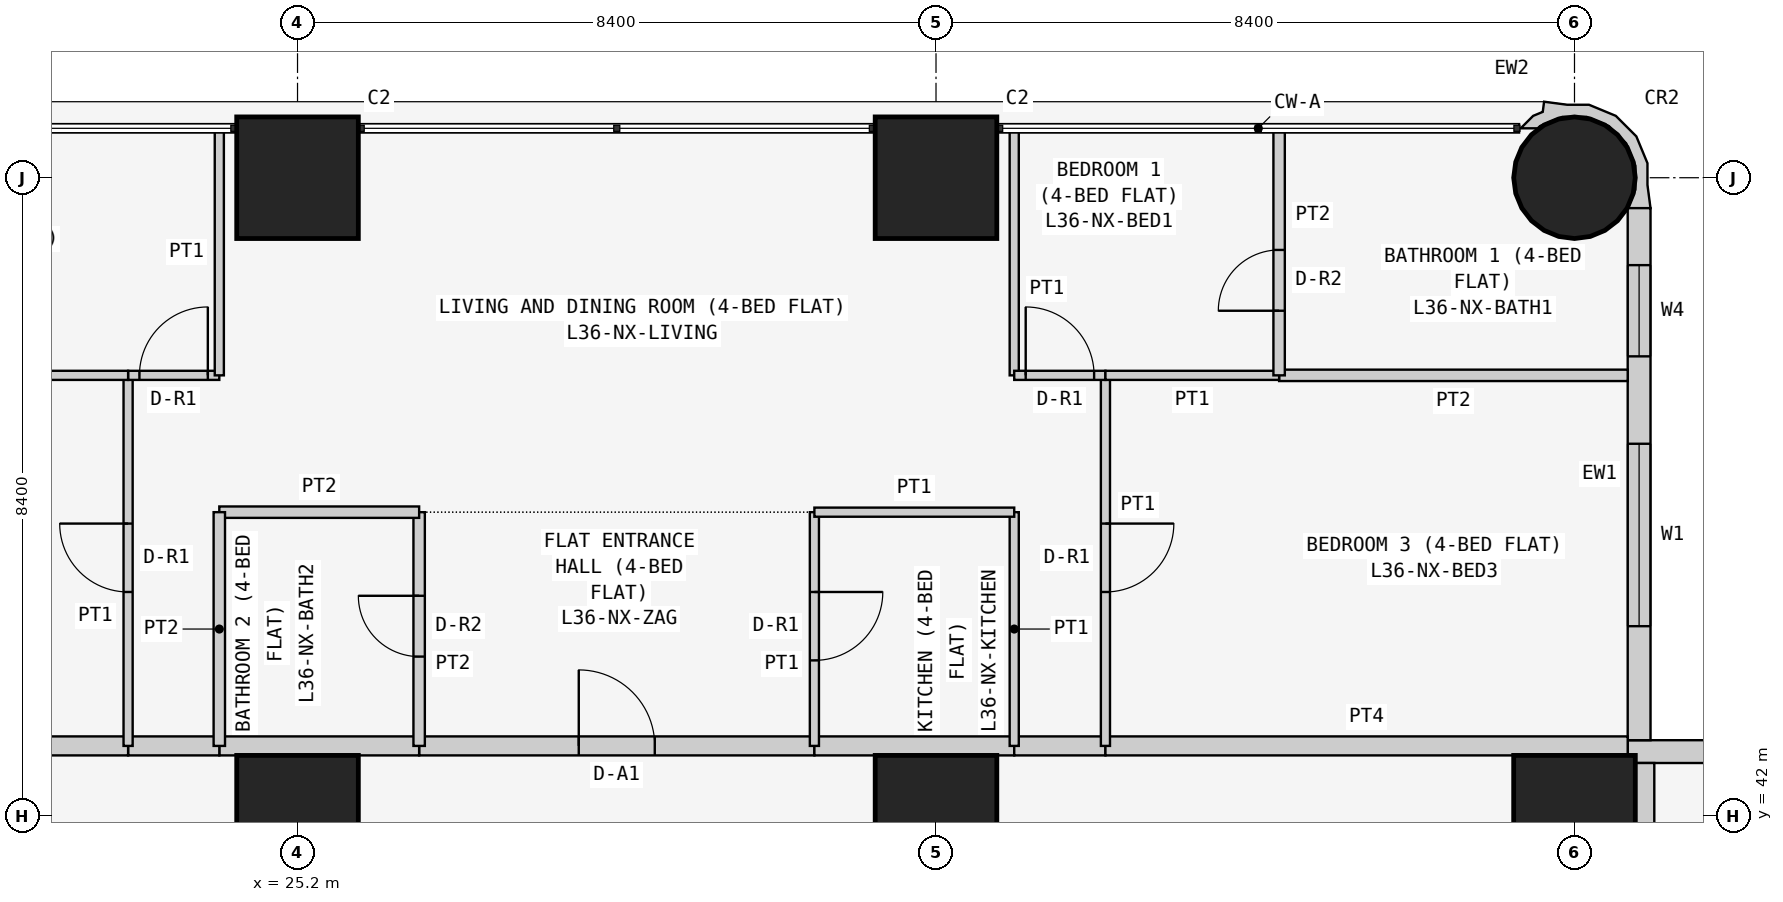
"""IFC4 building model, lengths in metres.
Left out: names, types, materials, properties, quantities, classifications, styles, units other than length and angle.
Written with IfcOpenShell. Run it as: python <this file> out.ifc"""

import sys

from ifc_helpers import new_model, si_unit, direction, frame, frame_2d, origin, origin_2d, place, context, subcontext, project, spatial, polyline, rectangle, circle, outline, extrude, element, fill, save


model = new_model("IFC4")
c1 = context("Model", 3, precision=1e-05, world=origin(), true_north=direction((0.0, 1.0)))
c2 = subcontext(c1, "Body", "Model", "MODEL_VIEW")
j1 = project(units=[si_unit("LENGTHUNIT", "METRE"), si_unit("PLANEANGLEUNIT", "RADIAN")], contexts=[c1])
p1 = place(None, origin())
s1 = spatial("IfcSite", under=j1, at=p1, CompositionType="ELEMENT")
p2 = place(p1, origin())
s2 = spatial("IfcBuilding", under=s1, at=p2, CompositionType="ELEMENT")
p3 = place(p2, frame((0.0, 0.0, 141.3)))
s3 = spatial("IfcBuildingStorey", under=s2, at=p3, CompositionType="ELEMENT", Elevation=141.3)
for number, where, z_axis, x_axis in (
    (1, (25.2, 42.0, 0.0), (0.0, 0.0, 1.0), (1.0, 0.0, 0.0)),
    (2, (25.2, 50.4, 0.0), (0.0, 0.0, 1.0), (1.0, 0.0, 0.0)),
    (3, (33.6, 42.0, 0.0), (0.0, 0.0, 1.0), (1.0, 0.0, 0.0)),
    (4, (33.6, 50.4, 0.0), (0.0, 0.0, 1.0), (1.0, 0.0, 0.0)),
    (5, (42.0, 42.0, 0.0), (0.0, 0.0, 1.0), (1.0, 0.0, 0.0)),
):
    element("IfcColumn", number, at=place(p3, frame(where, z_axis=z_axis, x_axis=x_axis)), inside=s3, PredefinedType="COLUMN", context=c2, shape_type="SweptSolid", body=[
        extrude(rectangle(XDim=1.6, YDim=1.6, at=origin_2d()), origin(), (0.0, 0.0, 1.0), 3.6),
    ])
p4 = place(p3, frame((42.0, 50.4, 0.0), z_axis=(0.0, 0.0, 1.0), x_axis=(1.0, 0.0, 0.0)))
e6 = element("IfcColumn", 6, at=p4, inside=s3, PredefinedType="COLUMN", context=c2, shape_type="SweptSolid", body=[
    extrude(circle(Radius=0.8, at=origin_2d()), origin(), (0.0, 0.0, 1.0), 3.6),
])
p5 = place(p3, frame((58.4, 42.85, 0.0), z_axis=(0.0, 0.0, 1.0), x_axis=(-1.0, 0.0, 0.0)))
e7 = element("IfcWall", 7, at=p5, inside=s3, PredefinedType="SOLIDWALL", context=c2, shape_type="SweptSolid", body=[
    extrude(rectangle(XDim=15.7, YDim=0.3, at=frame_2d((7.85, 0.0))), origin(), (0.0, 0.0, 1.0), 3.45),
])
p6 = place(p5, frame((12.4, 0.0, 0.9)))
e8 = element("IfcOpeningElement", 8, at=p6, cuts=e7, PredefinedType="OPENING", context=c2, shape_type="SweptSolid", body=[
    extrude(rectangle(XDim=1.8, YDim=1.5, at=frame_2d((0.9, 0.75))), frame((0.0, 0.16, 0.0), z_axis=(0.0, -1.0, 0.0), x_axis=(1.0, 0.0, 0.0)), (0.0, 0.0, 1.0), 0.32),
])
p7 = place(p5, frame((9.55, 0.0, 1.5)))
e9 = element("IfcOpeningElement", 9, at=p7, cuts=e7, PredefinedType="OPENING", context=c2, shape_type="SweptSolid", body=[
    extrude(rectangle(XDim=0.9, YDim=0.7, at=frame_2d((0.45, 0.35))), frame((0.0, 0.16, 0.0), z_axis=(0.0, -1.0, 0.0), x_axis=(1.0, 0.0, 0.0)), (0.0, 0.0, 1.0), 0.32),
])
p8 = place(p5, frame((5.1, 0.0, 0.9)))
e10 = element("IfcOpeningElement", 10, at=p8, cuts=e7, PredefinedType="OPENING", context=c2, shape_type="SweptSolid", body=[
    extrude(rectangle(XDim=1.8, YDim=1.5, at=frame_2d((0.9, 0.75))), frame((0.0, 0.16, 0.0), z_axis=(0.0, -1.0, 0.0), x_axis=(1.0, 0.0, 0.0)), (0.0, 0.0, 1.0), 0.32),
])
p9 = place(p5, frame((2.0, 0.0, 0.0)))
e11 = element("IfcOpeningElement", 11, at=p9, cuts=e7, PredefinedType="OPENING", context=c2, shape_type="SweptSolid", body=[
    extrude(rectangle(XDim=0.9, YDim=2.4, at=frame_2d((0.45, 1.2))), frame((0.0, 0.16, 0.0), z_axis=(0.0, -1.0, 0.0), x_axis=(1.0, 0.0, 0.0)), (0.0, 0.0, 1.0), 0.32),
])
p10 = place(p5, frame((0.7, 0.0, 0.9)))
e12 = element("IfcOpeningElement", 12, at=p10, cuts=e7, PredefinedType="OPENING", context=c2, shape_type="SweptSolid", body=[
    extrude(rectangle(XDim=1.2, YDim=1.5, at=frame_2d((0.6, 0.75))), frame((0.0, 0.16, 0.0), z_axis=(0.0, -1.0, 0.0), x_axis=(1.0, 0.0, 0.0)), (0.0, 0.0, 1.0), 0.32),
])
p11 = place(p3, frame((42.85, 43.0, 0.0), z_axis=(0.0, 0.0, 1.0), x_axis=(0.0, 1.0, 0.0)))
e13 = element("IfcWall", 13, at=p11, inside=s3, PredefinedType="SOLIDWALL", context=c2, shape_type="SweptSolid", body=[
    extrude(rectangle(XDim=7.0, YDim=0.3, at=frame_2d((3.5, 0.0))), origin(), (0.0, 0.0, 1.0), 3.45),
])
p12 = place(p11, frame((1.5, 0.0, 0.9)))
e14 = element("IfcOpeningElement", 14, at=p12, cuts=e13, PredefinedType="OPENING", context=c2, shape_type="SweptSolid", body=[
    extrude(rectangle(XDim=2.4, YDim=1.5, at=frame_2d((1.2, 0.75))), frame((0.0, 0.16, 0.0), z_axis=(0.0, -1.0, 0.0), x_axis=(1.0, 0.0, 0.0)), (0.0, 0.0, 1.0), 0.32),
])
p13 = place(p11, frame((5.05, 0.0, 0.9)))
e15 = element("IfcOpeningElement", 15, at=p13, cuts=e13, PredefinedType="OPENING", context=c2, shape_type="SweptSolid", body=[
    extrude(rectangle(XDim=1.2, YDim=1.5, at=frame_2d((0.6, 0.75))), frame((0.0, 0.16, 0.0), z_axis=(0.0, -1.0, 0.0), x_axis=(1.0, 0.0, 0.0)), (0.0, 0.0, 1.0), 0.32),
])
p14 = place(p3, frame((42.817, 50.073, 0.0), z_axis=(0.0, 0.0, 1.0), x_axis=(0.343276641956, 0.93923434088, 0.0)))
e16 = element("IfcWall", 16, at=p14, inside=s3, PredefinedType="SOLIDWALL", context=c2, shape_type="SweptSolid", body=[
    extrude(outline(polyline([(0.266, -0.055), (0.535, 0.044), (0.817, 0.302), (0.978, 0.648), (0.994, 1.03), (0.895, 1.3), (0.828, 1.598), (0.697, 1.569), (0.604, 1.67), (0.394, 1.767), (0.471, 1.556), (0.509, 1.539), (0.724, 1.304), (0.833, 1.005), (0.82, 0.687), (0.686, 0.397), (0.451, 0.182), (0.152, 0.073), (-0.116, 0.084), (-0.128, 0.078), (-0.146, 0.071), (-0.006, -0.197), (0.266, -0.055)])), origin(), (0.0, 0.0, 1.0), 3.45),
])
p15 = place(p3, frame((26.8, 42.925, 0.0), z_axis=(0.0, 0.0, 1.0), x_axis=(1.0, 0.0, 0.0)))
e17 = element("IfcWall", 17, at=p15, inside=s3, PredefinedType="PARTITIONING", context=c2, shape_type="SweptSolid", body=[
    extrude(rectangle(XDim=5.2, YDim=0.25, at=frame_2d((2.6, 0.0))), origin(), (0.0, 0.0, 1.0), 3.45),
])
p16 = place(p15, frame((2.1, 0.0, 0.0)))
e18 = element("IfcOpeningElement", 18, at=p16, cuts=e17, PredefinedType="OPENING", context=c2, shape_type="SweptSolid", body=[
    extrude(rectangle(XDim=1.0, YDim=2.1, at=frame_2d((0.5, 1.05))), frame((0.0, 0.135, 0.0), z_axis=(0.0, -1.0, 0.0), x_axis=(1.0, 0.0, 0.0)), (0.0, 0.0, 1.0), 0.27),
])
p17 = place(p3, frame((24.171, 42.925, 0.0), z_axis=(0.0, 0.0, 1.0), x_axis=(1.0, 0.0, 0.0)))
e19 = element("IfcWall", 19, at=p17, inside=s3, PredefinedType="PARTITIONING", context=c2, shape_type="SweptSolid", body=[
    extrude(rectangle(XDim=2.629, YDim=0.25, at=frame_2d((1.314, 0.0))), origin(), (0.0, 0.0, 1.0), 3.45),
])
p18 = place(p3, frame((32.0, 42.925, 0.0), z_axis=(0.0, 0.0, 1.0), x_axis=(1.0, 0.0, 0.0)))
e20 = element("IfcWall", 20, at=p18, inside=s3, PredefinedType="PARTITIONING", context=c2, shape_type="SweptSolid", body=[
    extrude(rectangle(XDim=2.629, YDim=0.25, at=frame_2d((1.314, 0.0))), origin(), (0.0, 0.0, 1.0), 3.45),
])
p19 = place(p3, frame((22.971, 42.925, 0.0), z_axis=(0.0, 0.0, 1.0), x_axis=(1.0, 0.0, 0.0)))
e21 = element("IfcWall", 21, at=p19, inside=s3, PredefinedType="PARTITIONING", context=c2, shape_type="SweptSolid", body=[
    extrude(rectangle(XDim=1.2, YDim=0.25, at=frame_2d((0.6, 0.0))), origin(), (0.0, 0.0, 1.0), 3.45),
])
p20 = place(p3, frame((34.629, 42.925, 0.0), z_axis=(0.0, 0.0, 1.0), x_axis=(1.0, 0.0, 0.0)))
e22 = element("IfcWall", 22, at=p20, inside=s3, PredefinedType="PARTITIONING", context=c2, shape_type="SweptSolid", body=[
    extrude(rectangle(XDim=1.2, YDim=0.25, at=frame_2d((0.6, 0.0))), origin(), (0.0, 0.0, 1.0), 3.45),
])
for number, where, z_axis, x_axis in (
    (23, (16.1, 42.925, 0.0), (0.0, 0.0, 1.0), (1.0, 0.0, 0.0)),
    (24, (35.829, 42.925, 0.0), (0.0, 0.0, 1.0), (1.0, 0.0, 0.0)),
    (25, (42.925, 42.7, 0.0), (0.0, 0.0, 1.0), (0.0, -1.0, 0.0)),
):
    element("IfcWall", number, at=place(p3, frame(where, z_axis=z_axis, x_axis=x_axis)), inside=s3, PredefinedType="PARTITIONING", context=c2, shape_type="SweptSolid", body=[
        extrude(rectangle(XDim=6.871, YDim=0.25, at=frame_2d((3.436, 0.0))), origin(), (0.0, 0.0, 1.0), 3.45),
    ])
p21 = place(p3, frame((26.8, 46.0, 0.0), z_axis=(0.0, 0.0, 1.0), x_axis=(0.0, -1.0, 0.0)))
e26 = element("IfcWall", 26, at=p21, inside=s3, PredefinedType="PARTITIONING", context=c2, shape_type="SweptSolid", body=[
    extrude(rectangle(XDim=3.075, YDim=0.15, at=frame_2d((1.538, 0.0))), origin(), (0.0, 0.0, 1.0), 3.45),
])
p22 = place(p21, frame((1.1, 0.0, 0.0)))
e27 = element("IfcOpeningElement", 27, at=p22, cuts=e26, PredefinedType="OPENING", context=c2, shape_type="SweptSolid", body=[
    extrude(rectangle(XDim=0.8, YDim=2.1, at=frame_2d((0.4, 1.05))), frame((0.0, 0.085, 0.0), z_axis=(0.0, -1.0, 0.0), x_axis=(1.0, 0.0, 0.0)), (0.0, 0.0, 1.0), 0.17),
])
p23 = place(p3, frame((32.0, 42.925, 0.0), z_axis=(0.0, 0.0, 1.0), x_axis=(0.0, 1.0, 0.0)))
e28 = element("IfcWall", 28, at=p23, inside=s3, PredefinedType="PARTITIONING", context=c2, shape_type="SweptSolid", body=[
    extrude(rectangle(XDim=3.075, YDim=0.12, at=frame_2d((1.538, 0.0))), origin(), (0.0, 0.0, 1.0), 3.45),
])
p24 = place(p23, frame((1.125, 0.0, 0.0)))
e29 = element("IfcOpeningElement", 29, at=p24, cuts=e28, PredefinedType="OPENING", context=c2, shape_type="SweptSolid", body=[
    extrude(rectangle(XDim=0.9, YDim=2.1, at=frame_2d((0.45, 1.05))), frame((0.0, 0.07, 0.0), z_axis=(0.0, -1.0, 0.0), x_axis=(1.0, 0.0, 0.0)), (0.0, 0.0, 1.0), 0.14),
])
p25 = place(p3, frame((26.8, 46.0, 0.0), z_axis=(0.0, 0.0, 1.0), x_axis=(-1.0, 0.0, 0.0)))
e30 = element("IfcWall", 30, at=p25, inside=s3, PredefinedType="PARTITIONING", context=c2, shape_type="SweptSolid", body=[
    extrude(rectangle(XDim=2.629, YDim=0.15, at=frame_2d((1.314, 0.0))), origin(), (0.0, 0.0, 1.0), 3.45),
])
p26 = place(p3, frame((24.171, 46.0, 0.0), z_axis=(0.0, 0.0, 1.0), x_axis=(0.0, -1.0, 0.0)))
e31 = element("IfcWall", 31, at=p26, inside=s3, PredefinedType="PARTITIONING", context=c2, shape_type="SweptSolid", body=[
    extrude(rectangle(XDim=3.075, YDim=0.15, at=frame_2d((1.538, 0.0))), origin(), (0.0, 0.0, 1.0), 3.45),
])
p27 = place(p3, frame((34.629, 42.925, 0.0), z_axis=(0.0, 0.0, 1.0), x_axis=(0.0, 1.0, 0.0)))
e32 = element("IfcWall", 32, at=p27, inside=s3, PredefinedType="PARTITIONING", context=c2, shape_type="SweptSolid", body=[
    extrude(rectangle(XDim=3.075, YDim=0.12, at=frame_2d((1.538, 0.0))), origin(), (0.0, 0.0, 1.0), 3.45),
])
p28 = place(p3, frame((34.629, 46.0, 0.0), z_axis=(0.0, 0.0, 1.0), x_axis=(-1.0, 0.0, 0.0)))
e33 = element("IfcWall", 33, at=p28, inside=s3, PredefinedType="PARTITIONING", context=c2, shape_type="SweptSolid", body=[
    extrude(rectangle(XDim=2.629, YDim=0.12, at=frame_2d((1.314, 0.0))), origin(), (0.0, 0.0, 1.0), 3.45),
])
p29 = place(p3, frame((22.971, 42.925, 0.0), z_axis=(0.0, 0.0, 1.0), x_axis=(0.0, 1.0, 0.0)))
e34 = element("IfcWall", 34, at=p29, inside=s3, PredefinedType="PARTITIONING", context=c2, shape_type="SweptSolid", body=[
    extrude(rectangle(XDim=4.875, YDim=0.12, at=frame_2d((2.438, 0.0))), origin(), (0.0, 0.0, 1.0), 3.45),
])
p30 = place(p29, frame((2.025, 0.0, 0.0)))
e35 = element("IfcOpeningElement", 35, at=p30, cuts=e34, PredefinedType="OPENING", context=c2, shape_type="SweptSolid", body=[
    extrude(rectangle(XDim=0.9, YDim=2.1, at=frame_2d((0.45, 1.05))), frame((0.0, 0.07, 0.0), z_axis=(0.0, -1.0, 0.0), x_axis=(1.0, 0.0, 0.0)), (0.0, 0.0, 1.0), 0.14),
])
p31 = place(p3, frame((22.971, 47.8, 0.0), z_axis=(0.0, 0.0, 1.0), x_axis=(1.0, 0.0, 0.0)))
e36 = element("IfcWall", 36, at=p31, inside=s3, PredefinedType="PARTITIONING", context=c2, shape_type="SweptSolid", body=[
    extrude(rectangle(XDim=1.2, YDim=0.12, at=frame_2d((0.6, 0.0))), origin(), (0.0, 0.0, 1.0), 3.45),
])
p32 = place(p31, frame((0.149, 0.0, 0.0)))
e37 = element("IfcOpeningElement", 37, at=p32, cuts=e36, PredefinedType="OPENING", context=c2, shape_type="SweptSolid", body=[
    extrude(rectangle(XDim=0.9, YDim=2.1, at=frame_2d((0.45, 1.05))), frame((0.0, 0.07, 0.0), z_axis=(0.0, -1.0, 0.0), x_axis=(1.0, 0.0, 0.0)), (0.0, 0.0, 1.0), 0.14),
])
p33 = place(p3, frame((24.171, 47.8, 0.0), z_axis=(0.0, 0.0, 1.0), x_axis=(0.0, 1.0, 0.0)))
e38 = element("IfcWall", 38, at=p33, inside=s3, PredefinedType="PARTITIONING", context=c2, shape_type="SweptSolid", body=[
    extrude(rectangle(XDim=3.25, YDim=0.12, at=frame_2d((1.625, 0.0))), origin(), (0.0, 0.0, 1.0), 3.45),
])
p34 = place(p3, frame((35.829, 47.8, 0.0), z_axis=(0.0, 0.0, 1.0), x_axis=(0.0, -1.0, 0.0)))
e39 = element("IfcWall", 39, at=p34, inside=s3, PredefinedType="PARTITIONING", context=c2, shape_type="SweptSolid", body=[
    extrude(rectangle(XDim=4.875, YDim=0.12, at=frame_2d((2.438, 0.0))), origin(), (0.0, 0.0, 1.0), 3.45),
])
p35 = place(p34, frame((1.95, 0.0, 0.0)))
e40 = element("IfcOpeningElement", 40, at=p35, cuts=e39, PredefinedType="OPENING", context=c2, shape_type="SweptSolid", body=[
    extrude(rectangle(XDim=0.9, YDim=2.1, at=frame_2d((0.45, 1.05))), frame((0.0, 0.07, 0.0), z_axis=(0.0, -1.0, 0.0), x_axis=(1.0, 0.0, 0.0)), (0.0, 0.0, 1.0), 0.14),
])
p36 = place(p3, frame((34.629, 51.05, 0.0), z_axis=(0.0, 0.0, 1.0), x_axis=(0.0, -1.0, 0.0)))
e41 = element("IfcWall", 41, at=p36, inside=s3, PredefinedType="PARTITIONING", context=c2, shape_type="SweptSolid", body=[
    extrude(rectangle(XDim=3.25, YDim=0.12, at=frame_2d((1.625, 0.0))), origin(), (0.0, 0.0, 1.0), 3.45),
])
p37 = place(p3, frame((34.629, 47.8, 0.0), z_axis=(0.0, 0.0, 1.0), x_axis=(1.0, 0.0, 0.0)))
e42 = element("IfcWall", 42, at=p37, inside=s3, PredefinedType="PARTITIONING", context=c2, shape_type="SweptSolid", body=[
    extrude(rectangle(XDim=1.2, YDim=0.12, at=frame_2d((0.6, 0.0))), origin(), (0.0, 0.0, 1.0), 3.45),
])
p38 = place(p37, frame((0.151, 0.0, 0.0)))
e43 = element("IfcOpeningElement", 43, at=p38, cuts=e42, PredefinedType="OPENING", context=c2, shape_type="SweptSolid", body=[
    extrude(rectangle(XDim=0.9, YDim=2.1, at=frame_2d((0.45, 1.05))), frame((0.0, 0.07, 0.0), z_axis=(0.0, -1.0, 0.0), x_axis=(1.0, 0.0, 0.0)), (0.0, 0.0, 1.0), 0.14),
])
p39 = place(p3, frame((22.971, 47.8, 0.0), z_axis=(0.0, 0.0, 1.0), x_axis=(-1.0, 0.0, 0.0)))
e44 = element("IfcWall", 44, at=p39, inside=s3, PredefinedType="PARTITIONING", context=c2, shape_type="SweptSolid", body=[
    extrude(rectangle(XDim=6.871, YDim=0.12, at=frame_2d((3.436, 0.0))), origin(), (0.0, 0.0, 1.0), 3.45),
])
p40 = place(p3, frame((42.7, 47.8, 0.0), z_axis=(0.0, 0.0, 1.0), x_axis=(-1.0, 0.0, 0.0)))
e45 = element("IfcWall", 45, at=p40, inside=s3, PredefinedType="PARTITIONING", context=c2, shape_type="SweptSolid", body=[
    extrude(rectangle(XDim=4.586, YDim=0.15, at=frame_2d((2.293, 0.0))), origin(), (0.0, 0.0, 1.0), 3.45),
])
p41 = place(p3, frame((38.114, 47.8, 0.0), z_axis=(0.0, 0.0, 1.0), x_axis=(-1.0, 0.0, 0.0)))
e46 = element("IfcWall", 46, at=p41, inside=s3, PredefinedType="PARTITIONING", context=c2, shape_type="SweptSolid", body=[
    extrude(rectangle(XDim=2.285, YDim=0.12, at=frame_2d((1.143, 0.0))), origin(), (0.0, 0.0, 1.0), 3.45),
])
p42 = place(p3, frame((38.114, 51.05, 0.0), z_axis=(0.0, 0.0, 1.0), x_axis=(0.0, -1.0, 0.0)))
e47 = element("IfcWall", 47, at=p42, inside=s3, PredefinedType="PARTITIONING", context=c2, shape_type="SweptSolid", body=[
    extrude(rectangle(XDim=3.25, YDim=0.15, at=frame_2d((1.625, 0.0))), origin(), (0.0, 0.0, 1.0), 3.45),
])
p43 = place(p42, frame((1.6, 0.0, 0.0)))
e48 = element("IfcOpeningElement", 48, at=p43, cuts=e47, PredefinedType="OPENING", context=c2, shape_type="SweptSolid", body=[
    extrude(rectangle(XDim=0.8, YDim=2.1, at=frame_2d((0.4, 1.05))), frame((0.0, 0.085, 0.0), z_axis=(0.0, -1.0, 0.0), x_axis=(1.0, 0.0, 0.0)), (0.0, 0.0, 1.0), 0.17),
])
p44 = place(p12, origin())
e49 = element("IfcWindow", 49, at=p44, inside=s3, PartitioningType="SINGLE_PANEL", PredefinedType="WINDOW", context=c2, shape_type="SweptSolid", body=[
    extrude(rectangle(XDim=2.4, YDim=1.5, at=frame_2d((1.2, 0.75))), frame((0.0, 0.03, 0.0), z_axis=(0.0, -1.0, 0.0), x_axis=(1.0, 0.0, 0.0)), (0.0, 0.0, 1.0), 0.06),
])
fill(e14, e49)
p45 = place(p13, origin())
e50 = element("IfcWindow", 50, at=p45, inside=s3, PartitioningType="SINGLE_PANEL", PredefinedType="WINDOW", context=c2, shape_type="SweptSolid", body=[
    extrude(rectangle(XDim=1.2, YDim=1.5, at=frame_2d((0.6, 0.75))), frame((0.0, 0.03, 0.0), z_axis=(0.0, -1.0, 0.0), x_axis=(1.0, 0.0, 0.0)), (0.0, 0.0, 1.0), 0.06),
])
fill(e15, e50)
p46 = place(p16, origin())
e51 = element("IfcDoor", 51, at=p46, inside=s3, OperationType="SINGLE_SWING_LEFT", PredefinedType="DOOR", context=c2, shape_type="SweptSolid", body=[
    extrude(rectangle(XDim=1.0, YDim=2.1, at=frame_2d((0.5, 1.05))), frame((0.0, 0.025, 0.0), z_axis=(0.0, -1.0, 0.0), x_axis=(1.0, 0.0, 0.0)), (0.0, 0.0, 1.0), 0.05),
])
fill(e18, e51)
p47 = place(p22, frame((0.8, 0.0, 0.0), z_axis=(0.0, 0.0, 1.0), x_axis=(-1.0, 0.0, 0.0)))
e52 = element("IfcDoor", 52, at=p47, inside=s3, OperationType="SINGLE_SWING_RIGHT", PredefinedType="DOOR", context=c2, shape_type="SweptSolid", body=[
    extrude(rectangle(XDim=0.8, YDim=2.1, at=frame_2d((0.4, 1.05))), frame((0.0, 0.025, 0.0), z_axis=(0.0, -1.0, 0.0), x_axis=(1.0, 0.0, 0.0)), (0.0, 0.0, 1.0), 0.05),
])
fill(e27, e52)
p48 = place(p24, frame((0.9, 0.0, 0.0), z_axis=(0.0, 0.0, 1.0), x_axis=(-1.0, 0.0, 0.0)))
e53 = element("IfcDoor", 53, at=p48, inside=s3, OperationType="SINGLE_SWING_LEFT", PredefinedType="DOOR", context=c2, shape_type="SweptSolid", body=[
    extrude(rectangle(XDim=0.9, YDim=2.1, at=frame_2d((0.45, 1.05))), frame((0.0, 0.025, 0.0), z_axis=(0.0, -1.0, 0.0), x_axis=(1.0, 0.0, 0.0)), (0.0, 0.0, 1.0), 0.05),
])
fill(e29, e53)
p49 = place(p30, origin())
e54 = element("IfcDoor", 54, at=p49, inside=s3, OperationType="SINGLE_SWING_RIGHT", PredefinedType="DOOR", context=c2, shape_type="SweptSolid", body=[
    extrude(rectangle(XDim=0.9, YDim=2.1, at=frame_2d((0.45, 1.05))), frame((0.0, 0.025, 0.0), z_axis=(0.0, -1.0, 0.0), x_axis=(1.0, 0.0, 0.0)), (0.0, 0.0, 1.0), 0.05),
])
fill(e35, e54)
p50 = place(p32, origin())
e55 = element("IfcDoor", 55, at=p50, inside=s3, OperationType="SINGLE_SWING_RIGHT", PredefinedType="DOOR", context=c2, shape_type="SweptSolid", body=[
    extrude(rectangle(XDim=0.9, YDim=2.1, at=frame_2d((0.45, 1.05))), frame((0.0, 0.025, 0.0), z_axis=(0.0, -1.0, 0.0), x_axis=(1.0, 0.0, 0.0)), (0.0, 0.0, 1.0), 0.05),
])
fill(e37, e55)
p51 = place(p35, origin())
e56 = element("IfcDoor", 56, at=p51, inside=s3, OperationType="SINGLE_SWING_LEFT", PredefinedType="DOOR", context=c2, shape_type="SweptSolid", body=[
    extrude(rectangle(XDim=0.9, YDim=2.1, at=frame_2d((0.45, 1.05))), frame((0.0, 0.025, 0.0), z_axis=(0.0, -1.0, 0.0), x_axis=(1.0, 0.0, 0.0)), (0.0, 0.0, 1.0), 0.05),
])
fill(e40, e56)
p52 = place(p38, origin())
e57 = element("IfcDoor", 57, at=p52, inside=s3, OperationType="SINGLE_SWING_LEFT", PredefinedType="DOOR", context=c2, shape_type="SweptSolid", body=[
    extrude(rectangle(XDim=0.9, YDim=2.1, at=frame_2d((0.45, 1.05))), frame((0.0, 0.025, 0.0), z_axis=(0.0, -1.0, 0.0), x_axis=(1.0, 0.0, 0.0)), (0.0, 0.0, 1.0), 0.05),
])
fill(e43, e57)
p53 = place(p43, frame((0.8, 0.0, 0.0), z_axis=(0.0, 0.0, 1.0), x_axis=(-1.0, 0.0, 0.0)))
e58 = element("IfcDoor", 58, at=p53, inside=s3, OperationType="SINGLE_SWING_LEFT", PredefinedType="DOOR", context=c2, shape_type="SweptSolid", body=[
    extrude(rectangle(XDim=0.8, YDim=2.1, at=frame_2d((0.4, 1.05))), frame((0.0, 0.025, 0.0), z_axis=(0.0, -1.0, 0.0), x_axis=(1.0, 0.0, 0.0)), (0.0, 0.0, 1.0), 0.05),
])
fill(e48, e58)
save(model, sys.argv[1])
